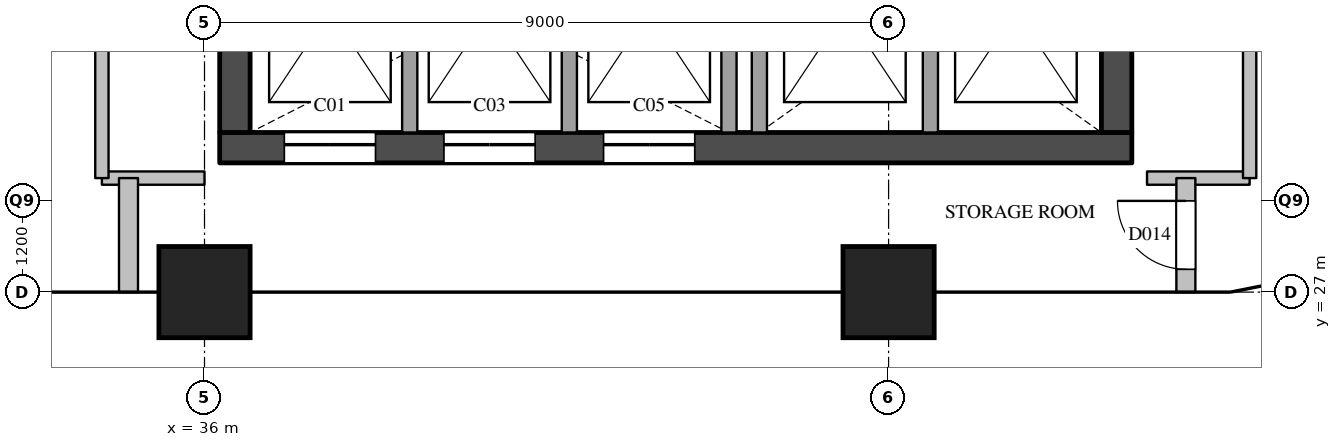
"""IFC4 building model, lengths in metres.
Left out: names, types, materials, properties, quantities, classifications, styles, units other than length and angle.
Written with IfcOpenShell. Run it as: python <this file> out.ifc"""

import sys

from ifc_helpers import new_model, si_unit, direction, frame, frame_2d, origin, origin_2d, place, context, subcontext, project, spatial, rectangle, extrude, element, fill, save


model = new_model("IFC4")
c1 = context("Model", 3, precision=1e-05, world=origin(), true_north=direction((0.0, 1.0)))
c2 = subcontext(c1, "Body", "Model", "MODEL_VIEW")
j1 = project(units=[si_unit("LENGTHUNIT", "METRE"), si_unit("PLANEANGLEUNIT", "RADIAN")], contexts=[c1])
p1 = place(None, origin())
s1 = spatial("IfcSite", under=j1, at=p1, CompositionType="ELEMENT")
p2 = place(p1, origin())
s2 = spatial("IfcBuilding", under=s1, at=p2, CompositionType="ELEMENT")
p3 = place(p2, frame((0.0, 0.0, 261.8)))
s3 = spatial("IfcBuildingStorey", under=s2, at=p3, CompositionType="ELEMENT", Elevation=261.8)
for number, where, z_axis, x_axis in (
    (1, (36.0, 27.0, 0.0), (0.0, 0.0, 1.0), (1.0, 0.0, 0.0)),
    (2, (45.0, 27.0, 0.0), (0.0, 0.0, 1.0), (1.0, 0.0, 0.0)),
):
    element("IfcColumn", number, at=place(p3, frame(where, z_axis=z_axis, x_axis=x_axis)), inside=s3, PredefinedType="COLUMN", context=c2, shape_type="SweptSolid", body=[
        extrude(rectangle(XDim=1.2, YDim=1.2, at=origin_2d()), origin(), (0.0, 0.0, 1.0), 3.9),
    ])
p4 = place(p3, frame((36.2, 28.9, 0.0), z_axis=(0.0, 0.0, 1.0), x_axis=(1.0, 0.0, 0.0)))
e3 = element("IfcWall", 3, at=p4, inside=s3, PredefinedType="SHEAR", context=c2, shape_type="SweptSolid", body=[
    extrude(rectangle(XDim=12.0, YDim=0.4, at=frame_2d((6.0, 0.0))), origin(), (0.0, 0.0, 1.0), 3.6),
])
p5 = place(p4, frame((0.85, 0.0, 0.0)))
e4 = element("IfcOpeningElement", 4, at=p5, cuts=e3, PredefinedType="OPENING", context=c2, shape_type="SweptSolid", body=[
    extrude(rectangle(XDim=1.2, YDim=2.1, at=frame_2d((0.6, 1.05))), frame((0.0, 0.21, 0.0), z_axis=(0.0, -1.0, 0.0), x_axis=(1.0, 0.0, 0.0)), (0.0, 0.0, 1.0), 0.42),
])
p6 = place(p4, frame((2.95, 0.0, 0.0)))
e5 = element("IfcOpeningElement", 5, at=p6, cuts=e3, PredefinedType="OPENING", context=c2, shape_type="SweptSolid", body=[
    extrude(rectangle(XDim=1.2, YDim=2.1, at=frame_2d((0.6, 1.05))), frame((0.0, 0.21, 0.0), z_axis=(0.0, -1.0, 0.0), x_axis=(1.0, 0.0, 0.0)), (0.0, 0.0, 1.0), 0.42),
])
p7 = place(p4, frame((5.05, 0.0, 0.0)))
e6 = element("IfcOpeningElement", 6, at=p7, cuts=e3, PredefinedType="OPENING", context=c2, shape_type="SweptSolid", body=[
    extrude(rectangle(XDim=1.2, YDim=2.1, at=frame_2d((0.6, 1.05))), frame((0.0, 0.21, 0.0), z_axis=(0.0, -1.0, 0.0), x_axis=(1.0, 0.0, 0.0)), (0.0, 0.0, 1.0), 0.42),
])
p8 = place(p3, frame((36.4, 29.1, 0.0), z_axis=(0.0, 0.0, 1.0), x_axis=(0.0, 1.0, 0.0)))
e7 = element("IfcWall", 7, at=p8, inside=s3, PredefinedType="SHEAR", context=c2, shape_type="SweptSolid", body=[
    extrude(rectangle(XDim=20.3, YDim=0.4, at=frame_2d((10.15, 0.0))), origin(), (0.0, 0.0, 1.0), 3.6),
])
p9 = place(p8, frame((3.6, 0.0, 0.0)))
e8 = element("IfcOpeningElement", 8, at=p9, cuts=e7, PredefinedType="OPENING", context=c2, shape_type="SweptSolid", body=[
    extrude(rectangle(XDim=1.8, YDim=2.1, at=frame_2d((0.9, 1.05))), frame((0.0, 0.21, 0.0), z_axis=(0.0, -1.0, 0.0), x_axis=(1.0, 0.0, 0.0)), (0.0, 0.0, 1.0), 0.42),
])
p10 = place(p8, frame((16.4, 0.0, 0.0)))
e9 = element("IfcOpeningElement", 9, at=p10, cuts=e7, PredefinedType="OPENING", context=c2, shape_type="SweptSolid", body=[
    extrude(rectangle(XDim=1.0, YDim=2.1, at=frame_2d((0.5, 1.05))), frame((0.0, 0.21, 0.0), z_axis=(0.0, -1.0, 0.0), x_axis=(1.0, 0.0, 0.0)), (0.0, 0.0, 1.0), 0.42),
])
p11 = place(p3, frame((48.0, 29.1, 0.0), z_axis=(0.0, 0.0, 1.0), x_axis=(0.0, 1.0, 0.0)))
e10 = element("IfcWall", 10, at=p11, inside=s3, PredefinedType="SHEAR", context=c2, shape_type="SweptSolid", body=[
    extrude(rectangle(XDim=20.3, YDim=0.4, at=frame_2d((10.15, 0.0))), origin(), (0.0, 0.0, 1.0), 3.6),
])
p12 = place(p11, frame((12.5, 0.0, 0.0)))
e11 = element("IfcOpeningElement", 11, at=p12, cuts=e10, PredefinedType="OPENING", context=c2, shape_type="SweptSolid", body=[
    extrude(rectangle(XDim=0.7, YDim=2.1, at=frame_2d((0.35, 1.05))), frame((0.0, 0.21, 0.0), z_axis=(0.0, -1.0, 0.0), x_axis=(1.0, 0.0, 0.0)), (0.0, 0.0, 1.0), 0.42),
])
p13 = place(p11, frame((3.9, 0.0, 0.0)))
e12 = element("IfcOpeningElement", 12, at=p13, cuts=e10, PredefinedType="OPENING", context=c2, shape_type="SweptSolid", body=[
    extrude(rectangle(XDim=1.8, YDim=2.1, at=frame_2d((0.9, 1.05))), frame((0.0, 0.21, 0.0), z_axis=(0.0, -1.0, 0.0), x_axis=(1.0, 0.0, 0.0)), (0.0, 0.0, 1.0), 0.42),
])
for number, where, z_axis, x_axis in (
    (13, (38.7, 29.1, 0.0), (0.0, 0.0, 1.0), (0.0, 1.0, 0.0)),
    (14, (40.8, 29.1, 0.0), (0.0, 0.0, 1.0), (0.0, 1.0, 0.0)),
    (15, (42.9, 29.1, 0.0), (0.0, 0.0, 1.0), (0.0, 1.0, 0.0)),
):
    element("IfcWall", number, at=place(p3, frame(where, z_axis=z_axis, x_axis=x_axis)), inside=s3, PredefinedType="SOLIDWALL", context=c2, shape_type="SweptSolid", body=[
        extrude(rectangle(XDim=3.2, YDim=0.2, at=frame_2d((1.6, 0.0))), origin(), (0.0, 0.0, 1.0), 3.6),
    ])
p14 = place(p3, frame((43.3, 29.1, 0.0), z_axis=(0.0, 0.0, 1.0), x_axis=(0.0, 1.0, 0.0)))
e16 = element("IfcWall", 16, at=p14, inside=s3, PredefinedType="SOLIDWALL", context=c2, shape_type="SweptSolid", body=[
    extrude(rectangle(XDim=9.9, YDim=0.2, at=frame_2d((4.95, 0.0))), origin(), (0.0, 0.0, 1.0), 3.6),
])
p15 = place(p3, frame((45.55, 29.1, 0.0), z_axis=(0.0, 0.0, 1.0), x_axis=(0.0, 1.0, 0.0)))
e17 = element("IfcWall", 17, at=p15, inside=s3, PredefinedType="SOLIDWALL", context=c2, shape_type="SweptSolid", body=[
    extrude(rectangle(XDim=3.2, YDim=0.2, at=frame_2d((1.6, 0.0))), origin(), (0.0, 0.0, 1.0), 3.6),
])
for number, where, z_axis, x_axis in (
    (18, (34.65, 28.5, 0.0), (0.0, 0.0, 1.0), (1.0, 0.0, 0.0)),
    (19, (48.4, 28.5, 0.0), (0.0, 0.0, 1.0), (1.0, 0.0, 0.0)),
):
    element("IfcWall", number, at=place(p3, frame(where, z_axis=z_axis, x_axis=x_axis)), inside=s3, PredefinedType="PARTITIONING", context=c2, shape_type="SweptSolid", body=[
        extrude(rectangle(XDim=1.35, YDim=0.175, at=frame_2d((0.675, 0.0))), origin(), (0.0, 0.0, 1.0), 3.6),
    ])
p16 = place(p3, frame((34.65, 28.5, 0.0), z_axis=(0.0, 0.0, 1.0), x_axis=(0.0, 1.0, 0.0)))
e20 = element("IfcWall", 20, at=p16, inside=s3, PredefinedType="PARTITIONING", context=c2, shape_type="SweptSolid", body=[
    extrude(rectangle(XDim=22.85, YDim=0.175, at=frame_2d((11.425, 0.0))), origin(), (0.0, 0.0, 1.0), 3.6),
])
p17 = place(p16, frame((5.3, 0.0, 0.0)))
e21 = element("IfcOpeningElement", 21, at=p17, cuts=e20, PredefinedType="OPENING", context=c2, shape_type="SweptSolid", body=[
    extrude(rectangle(XDim=0.9, YDim=2.1, at=frame_2d((0.45, 1.05))), frame((0.0, 0.097, 0.0), z_axis=(0.0, -1.0, 0.0), x_axis=(1.0, 0.0, 0.0)), (0.0, 0.0, 1.0), 0.195),
])
p18 = place(p16, frame((13.5, 0.0, 0.0)))
e22 = element("IfcOpeningElement", 22, at=p18, cuts=e20, PredefinedType="OPENING", context=c2, shape_type="SweptSolid", body=[
    extrude(rectangle(XDim=1.0, YDim=2.1, at=frame_2d((0.5, 1.05))), frame((0.0, 0.097, 0.0), z_axis=(0.0, -1.0, 0.0), x_axis=(1.0, 0.0, 0.0)), (0.0, 0.0, 1.0), 0.195),
])
p19 = place(p16, frame((16.9, 0.0, 0.0)))
e23 = element("IfcOpeningElement", 23, at=p19, cuts=e20, PredefinedType="OPENING", context=c2, shape_type="SweptSolid", body=[
    extrude(rectangle(XDim=1.0, YDim=2.1, at=frame_2d((0.5, 1.05))), frame((0.0, 0.097, 0.0), z_axis=(0.0, -1.0, 0.0), x_axis=(1.0, 0.0, 0.0)), (0.0, 0.0, 1.0), 0.195),
])
p20 = place(p3, frame((49.75, 28.5, 0.0), z_axis=(0.0, 0.0, 1.0), x_axis=(0.0, 1.0, 0.0)))
e24 = element("IfcWall", 24, at=p20, inside=s3, PredefinedType="PARTITIONING", context=c2, shape_type="SweptSolid", body=[
    extrude(rectangle(XDim=22.85, YDim=0.175, at=frame_2d((11.425, 0.0))), origin(), (0.0, 0.0, 1.0), 3.6),
])
p21 = place(p20, frame((5.3, 0.0, 0.0)))
e25 = element("IfcOpeningElement", 25, at=p21, cuts=e24, PredefinedType="OPENING", context=c2, shape_type="SweptSolid", body=[
    extrude(rectangle(XDim=0.9, YDim=2.1, at=frame_2d((0.45, 1.05))), frame((0.0, 0.097, 0.0), z_axis=(0.0, -1.0, 0.0), x_axis=(1.0, 0.0, 0.0)), (0.0, 0.0, 1.0), 0.195),
])
p22 = place(p20, frame((16.725, 0.0, 0.0)))
e26 = element("IfcOpeningElement", 26, at=p22, cuts=e24, PredefinedType="OPENING", context=c2, shape_type="SweptSolid", body=[
    extrude(rectangle(XDim=0.9, YDim=2.1, at=frame_2d((0.45, 1.05))), frame((0.0, 0.097, 0.0), z_axis=(0.0, -1.0, 0.0), x_axis=(1.0, 0.0, 0.0)), (0.0, 0.0, 1.0), 0.195),
])
p23 = place(p3, frame((35.0, 27.0, 0.0), z_axis=(0.0, 0.0, 1.0), x_axis=(0.0, 1.0, 0.0)))
e27 = element("IfcWall", 27, at=p23, inside=s3, PredefinedType="PARTITIONING", context=c2, shape_type="SweptSolid", body=[
    extrude(rectangle(XDim=1.5, YDim=0.25, at=frame_2d((0.75, 0.0))), origin(), (0.0, 0.0, 1.0), 2.6),
])
p24 = place(p3, frame((48.911, 27.0, 0.0), z_axis=(0.0, 0.0, 1.0), x_axis=(0.0, 1.0, 0.0)))
e28 = element("IfcWall", 28, at=p24, inside=s3, PredefinedType="PARTITIONING", context=c2, shape_type="SweptSolid", body=[
    extrude(rectangle(XDim=1.5, YDim=0.25, at=frame_2d((0.75, 0.0))), origin(), (0.0, 0.0, 1.0), 2.6),
])
p25 = place(p24, frame((0.3, 0.0, 0.0)))
e29 = element("IfcOpeningElement", 29, at=p25, cuts=e28, PredefinedType="OPENING", context=c2, shape_type="SweptSolid", body=[
    extrude(rectangle(XDim=0.9, YDim=2.1, at=frame_2d((0.45, 1.05))), frame((0.0, 0.135, 0.0), z_axis=(0.0, -1.0, 0.0), x_axis=(1.0, 0.0, 0.0)), (0.0, 0.0, 1.0), 0.27),
])
p26 = place(p5, origin())
e30 = element("IfcDoor", 30, at=p26, inside=s3, OperationType="SLIDING_TO_LEFT", PredefinedType="DOOR", context=c2, shape_type="SweptSolid", body=[
    extrude(rectangle(XDim=1.2, YDim=2.1, at=frame_2d((0.6, 1.05))), frame((0.0, 0.025, 0.0), z_axis=(0.0, -1.0, 0.0), x_axis=(1.0, 0.0, 0.0)), (0.0, 0.0, 1.0), 0.05),
])
fill(e4, e30)
p27 = place(p6, origin())
e31 = element("IfcDoor", 31, at=p27, inside=s3, OperationType="SLIDING_TO_LEFT", PredefinedType="DOOR", context=c2, shape_type="SweptSolid", body=[
    extrude(rectangle(XDim=1.2, YDim=2.1, at=frame_2d((0.6, 1.05))), frame((0.0, 0.025, 0.0), z_axis=(0.0, -1.0, 0.0), x_axis=(1.0, 0.0, 0.0)), (0.0, 0.0, 1.0), 0.05),
])
fill(e5, e31)
p28 = place(p7, origin())
e32 = element("IfcDoor", 32, at=p28, inside=s3, OperationType="SLIDING_TO_LEFT", PredefinedType="DOOR", context=c2, shape_type="SweptSolid", body=[
    extrude(rectangle(XDim=1.2, YDim=2.1, at=frame_2d((0.6, 1.05))), frame((0.0, 0.025, 0.0), z_axis=(0.0, -1.0, 0.0), x_axis=(1.0, 0.0, 0.0)), (0.0, 0.0, 1.0), 0.05),
])
fill(e6, e32)
p29 = place(p25, origin())
e33 = element("IfcDoor", 33, at=p29, inside=s3, OperationType="SINGLE_SWING_RIGHT", PredefinedType="DOOR", context=c2, shape_type="SweptSolid", body=[
    extrude(rectangle(XDim=0.9, YDim=2.1, at=frame_2d((0.45, 1.05))), frame((0.0, 0.025, 0.0), z_axis=(0.0, -1.0, 0.0), x_axis=(1.0, 0.0, 0.0)), (0.0, 0.0, 1.0), 0.05),
])
fill(e29, e33)
save(model, sys.argv[1])
